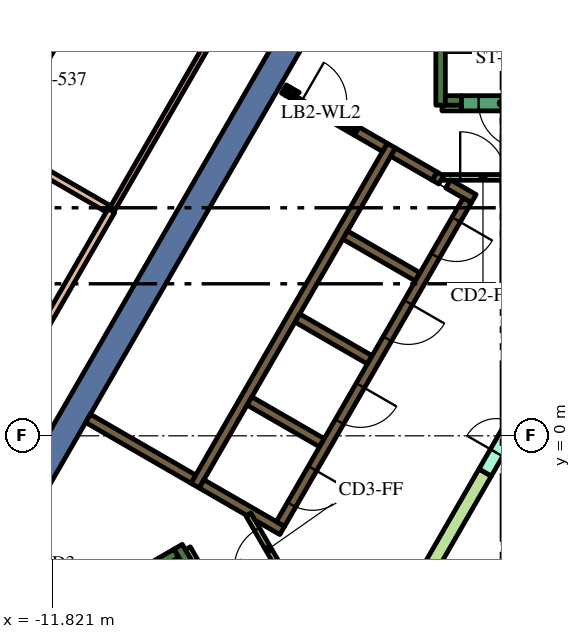
"""IFC4 building model, lengths in metres.
Left out: names, types, materials, properties, quantities, classifications, styles, units other than length and angle.
Written with IfcOpenShell. Run it as: python <this file> out.ifc"""

import sys

from ifc_helpers import new_model, si_unit, direction, frame, frame_2d, origin, place, context, subcontext, project, spatial, polyline, rectangle, outline, extrude, element, fill, save


model = new_model("IFC4")
c1 = context("Model", 3, precision=1e-05, world=origin(), true_north=direction((0.0, 1.0)))
c2 = subcontext(c1, "Body", "Model", "MODEL_VIEW")
j1 = project(units=[si_unit("LENGTHUNIT", "METRE"), si_unit("PLANEANGLEUNIT", "RADIAN")], contexts=[c1])
p1 = place(None, origin())
s1 = spatial("IfcSite", under=j1, at=p1, CompositionType="ELEMENT")
p2 = place(p1, origin())
s2 = spatial("IfcBuilding", under=s1, at=p2, CompositionType="ELEMENT")
p3 = place(p2, frame((0.0, 0.0, 261.6)))
s3 = spatial("IfcBuildingStorey", under=s2, at=p3, CompositionType="ELEMENT", Elevation=261.6)
p4 = place(p3, frame((-12.625, -1.867, 0.0), z_axis=(0.0, 0.0, 1.0), x_axis=(0.499996974394, 0.866027150612, 0.0)))
e1 = element("IfcWall", 1, at=p4, inside=s3, PredefinedType="SOLIDWALL", context=c2, shape_type="SweptSolid", body=[
    extrude(rectangle(XDim=15.858, YDim=0.7, at=frame_2d((7.929, 0.0))), origin(), (0.0, 0.0, 1.0), 5.4),
])
p5 = place(p3, frame((-1.6, 8.7, 0.0), z_axis=(0.0, 0.0, 1.0), x_axis=(0.0, 1.0, 0.0)))
e2 = element("IfcWall", 2, at=p5, inside=s3, PredefinedType="SOLIDWALL", context=c2, shape_type="SweptSolid", body=[
    extrude(rectangle(XDim=7.05, YDim=0.25, at=frame_2d((3.525, 0.0))), origin(), (0.0, 0.0, 1.0), 5.4),
])
p6 = place(p3, frame((-1.475, 8.825, 0.0), z_axis=(0.0, 0.0, 1.0), x_axis=(1.0, 0.0, 0.0)))
e3 = element("IfcWall", 3, at=p6, inside=s3, PredefinedType="SOLIDWALL", context=c2, shape_type="SweptSolid", body=[
    extrude(rectangle(XDim=0.425, YDim=0.25, at=frame_2d((0.212, 0.0))), origin(), (0.0, 0.0, 1.0), 5.4),
])
p7 = place(p3, frame((-14.44, -6.49, 0.0), z_axis=(0.0, 0.0, 1.0), x_axis=(0.866022966069, 0.500004222222, 0.0)))
e4 = element("IfcWall", 4, at=p7, inside=s3, PredefinedType="SOLIDWALL", context=c2, shape_type="SweptSolid", body=[
    extrude(rectangle(XDim=6.8, YDim=0.25, at=frame_2d((3.4, 0.0))), origin(), (0.0, 0.0, 1.0), 5.4),
])
p8 = place(p3, frame((-8.168, -3.503, 0.0), z_axis=(0.0, 0.0, 1.0), x_axis=(-0.499952099219, 0.866053057547, 0.0)))
e5 = element("IfcWall", 5, at=p8, inside=s3, PredefinedType="SOLIDWALL", context=c2, shape_type="SweptSolid", body=[
    extrude(rectangle(XDim=0.675, YDim=0.25, at=frame_2d((0.337, 0.0))), origin(), (0.0, 0.0, 1.0), 5.4),
])
p9 = place(p3, frame((-8.06, -1.311, 0.0), z_axis=(0.0, 0.0, 1.0), x_axis=(0.50000273126, 0.866023826885, 0.0)))
e6 = element("IfcWall", 6, at=p9, inside=s3, PredefinedType="SOLIDWALL", context=c2, shape_type="SweptSolid", body=[
    extrude(rectangle(XDim=10.33, YDim=0.25, at=frame_2d((5.165, 0.0))), origin(), (0.0, 0.0, 1.0), 5.4),
])
p10 = place(p3, frame((-1.758, 6.835, 0.0), z_axis=(0.0, 0.0, 1.0), x_axis=(0.865982457891, -0.500074377092, 0.0)))
e7 = element("IfcWall", 7, at=p10, inside=s3, PredefinedType="SOLIDWALL", context=c2, shape_type="SweptSolid", body=[
    extrude(rectangle(XDim=0.2, YDim=0.25, at=frame_2d((0.1, 0.0))), origin(), (0.0, 0.0, 1.0), 5.4),
])
p11 = place(p3, frame((-1.76, 6.836, 0.0), z_axis=(0.0, 0.0, 1.0), x_axis=(-0.865952863304, 0.500125622755, 0.0)))
e8 = element("IfcWall", 8, at=p11, inside=s3, PredefinedType="SOLIDWALL", context=c2, shape_type="SweptSolid", body=[
    extrude(rectangle(XDim=1.258, YDim=0.25, at=frame_2d((0.629, 0.0))), origin(), (0.0, 0.0, 1.0), 5.4),
])
p12 = place(p3, frame((-0.728, 6.24, 0.0), z_axis=(0.0, 0.0, 1.0), x_axis=(-0.865955664968, 0.500120771724, 0.0)))
e9 = element("IfcWall", 9, at=p12, inside=s3, PredefinedType="SOLIDWALL", context=c2, shape_type="SweptSolid", body=[
    extrude(rectangle(XDim=0.778, YDim=0.25, at=frame_2d((0.389, 0.0))), origin(), (0.0, 0.0, 1.0), 5.4),
])
for number, where, z_axis, x_axis in (
    (10, (-2.204, 4.182, 0.0), (0.0, 0.0, 1.0), (-0.866, 0.5, 0.0)),
    (11, (-5.369, 3.1, 0.0), (0.0, 0.0, 1.0), (0.866, -0.5, 0.0)),
    (12, (-4.724, -0.182, 0.0), (0.0, 0.0, 1.0), (-0.866, 0.5, 0.0)),
):
    element("IfcWall", number, at=place(p3, frame(where, z_axis=z_axis, x_axis=x_axis)), inside=s3, PredefinedType="SOLIDWALL", context=c2, shape_type="SweptSolid", body=[
        extrude(rectangle(XDim=2.2, YDim=0.25, at=frame_2d((1.1, 0.0))), origin(), (0.0, 0.0, 1.0), 5.4),
    ])
p13 = place(p3, origin())
e13 = element("IfcWall", 13, at=p13, inside=s3, PredefinedType="SOLIDWALL", context=c2, shape_type="SweptSolid", body=[
    extrude(outline(polyline([(-5.922, -2.257), (-5.922, -2.257), (-5.705, -2.382), (-5.83, -2.598), (-6.483, -2.221), (-6.591, -2.033), (-6.591, -2.033), (-6.7, -2.096), (-7.952, -1.373), (-7.827, -1.156), (-5.922, -2.257)])), origin(), (0.0, 0.0, 1.0), 5.4),
])
p14 = place(p3, frame((-8.106, -1.14, 0.0), z_axis=(0.0, 0.0, 1.0), x_axis=(-0.866008981251, 0.500028443584, 0.0)))
e14 = element("IfcWall", 14, at=p14, inside=s3, PredefinedType="SOLIDWALL", context=c2, shape_type="SweptSolid", body=[
    extrude(rectangle(XDim=3.2, YDim=0.25, at=frame_2d((1.6, 0.0))), origin(), (0.0, 0.0, 1.0), 5.4),
])
p15 = place(p3, frame((-5.725, 9.125, 0.0), z_axis=(0.0, 0.0, 1.0), x_axis=(0.866185586049, -0.49972245349, 0.0)))
e15 = element("IfcWall", 15, at=p15, inside=s3, PredefinedType="SOLIDWALL", context=c2, shape_type="SweptSolid", body=[
    extrude(rectangle(XDim=0.11, YDim=0.25, at=frame_2d((0.055, 0.0))), origin(), (0.0, 0.0, 1.0), 5.4),
])
p16 = place(p3, frame((-3.066, 7.59, 0.0), z_axis=(0.0, 0.0, 1.0), x_axis=(-0.866081358704, 0.49990307071, 0.0)))
e16 = element("IfcWall", 16, at=p16, inside=s3, PredefinedType="SOLIDWALL", context=c2, shape_type="SweptSolid", body=[
    extrude(rectangle(XDim=0.858, YDim=0.25, at=frame_2d((0.429, 0.0))), origin(), (0.0, 0.0, 1.0), 5.4),
])
e17 = element("IfcWall", 17, at=p13, inside=s3, PredefinedType="SOLIDWALL", context=c2, shape_type="SweptSolid", body=[
    extrude(outline(polyline([(-3.748, 8.128), (-3.813, 8.015), (-4.027, 8.139), (-4.017, 8.156), (-4.008, 8.173), (-4.0, 8.192), (-3.995, 8.21), (-3.991, 8.23), (-3.99, 8.25), (-3.99, 8.268), (-3.748, 8.128)])), origin(), (0.0, 0.0, 1.0), 5.4),
])
e18 = element("IfcWall", 18, at=p13, inside=s3, PredefinedType="SOLIDWALL", context=c2, shape_type="SweptSolid", body=[
    extrude(outline(polyline([(-5.689, 8.96), (-5.69, 8.961), (-5.565, 9.177), (-5.319, 9.035), (-5.335, 9.026), (-5.351, 9.015), (-5.366, 9.002), (-5.379, 8.988), (-5.392, 8.972), (-5.402, 8.956), (-5.412, 8.939), (-5.629, 9.064), (-5.629, 9.064), (-5.689, 8.96)])), origin(), (0.0, 0.0, 1.0), 5.4),
])
for number, where, z_axis, x_axis in (
    (19, (-8.252, -2.958, 0.0), (0.0, 0.0, 1.0), (0.5, -0.866, 0.0)),
    (20, (-1.564, 8.625, 0.0), (0.0, 0.0, 1.0), (1.0, 0.0, 0.0)),
):
    element("IfcWall", number, at=place(p3, frame(where, z_axis=z_axis, x_axis=x_axis)), inside=s3, PredefinedType="PARTITIONING", context=c2, shape_type="SweptSolid", body=[
        extrude(rectangle(XDim=0.514, YDim=0.15, at=frame_2d((0.257, 0.0))), origin(), (0.0, 0.0, 1.0), 4.75),
    ])
e21 = element("IfcWall", 21, at=p13, inside=s3, PredefinedType="PARTITIONING", context=c2, shape_type="SweptSolid", body=[
    extrude(outline(polyline([(-0.59, -0.872), (-0.265, -1.059), (-1.822, -3.756), (-2.147, -3.568), (-0.59, -0.872)])), origin(), (0.0, 0.0, 1.0), 4.75),
])
p17 = place(p3, frame((-0.898, 6.194, 0.0), z_axis=(0.0, 0.0, 1.0), x_axis=(-0.499996202215, -0.866027596426, 0.0)))
e22 = element("IfcWall", 22, at=p17, inside=s3, PredefinedType="SOLIDWALL", context=c2, shape_type="SweptSolid", body=[
    extrude(rectangle(XDim=9.83, YDim=0.25, at=frame_2d((4.915, 0.0))), origin(), (0.0, 0.0, 1.0), 5.4),
])
p18 = place(p17, frame((0.585, 0.0, 0.0)))
e23 = element("IfcOpeningElement", 23, at=p18, cuts=e22, PredefinedType="OPENING", context=c2, shape_type="SweptSolid", body=[
    extrude(rectangle(XDim=1.1, YDim=2.1, at=frame_2d((0.55, 1.05))), frame((0.0, 0.135, 0.0), z_axis=(0.0, -1.0, 0.0), x_axis=(1.0, 0.0, 0.0)), (0.0, 0.0, 1.0), 0.27),
])
p19 = place(p17, frame((3.105, 0.0, 0.0)))
e24 = element("IfcOpeningElement", 24, at=p19, cuts=e22, PredefinedType="OPENING", context=c2, shape_type="SweptSolid", body=[
    extrude(rectangle(XDim=1.1, YDim=2.1, at=frame_2d((0.55, 1.05))), frame((0.0, 0.135, 0.0), z_axis=(0.0, -1.0, 0.0), x_axis=(1.0, 0.0, 0.0)), (0.0, 0.0, 1.0), 0.27),
])
p20 = place(p17, frame((5.625, 0.0, 0.0)))
e25 = element("IfcOpeningElement", 25, at=p20, cuts=e22, PredefinedType="OPENING", context=c2, shape_type="SweptSolid", body=[
    extrude(rectangle(XDim=1.1, YDim=2.1, at=frame_2d((0.55, 1.05))), frame((0.0, 0.135, 0.0), z_axis=(0.0, -1.0, 0.0), x_axis=(1.0, 0.0, 0.0)), (0.0, 0.0, 1.0), 0.27),
])
p21 = place(p17, frame((8.145, 0.0, 0.0)))
e26 = element("IfcOpeningElement", 26, at=p21, cuts=e22, PredefinedType="OPENING", context=c2, shape_type="SweptSolid", body=[
    extrude(rectangle(XDim=1.1, YDim=2.1, at=frame_2d((0.55, 1.05))), frame((0.0, 0.135, 0.0), z_axis=(0.0, -1.0, 0.0), x_axis=(1.0, 0.0, 0.0)), (0.0, 0.0, 1.0), 0.27),
])
p22 = place(p3, frame((1.05, 8.75, 0.0), z_axis=(0.0, 0.0, 1.0), x_axis=(-1.0, 0.0, 0.0)))
e27 = element("IfcWall", 27, at=p22, inside=s3, PredefinedType="SOLIDWALL", context=c2, shape_type="SweptSolid", body=[
    extrude(rectangle(XDim=2.1, YDim=0.4, at=frame_2d((1.05, 0.0))), origin(), (0.0, 0.0, 1.0), 5.4),
])
p23 = place(p22, frame((0.45, 0.0, 0.0)))
e28 = element("IfcOpeningElement", 28, at=p23, cuts=e27, PredefinedType="OPENING", context=c2, shape_type="SweptSolid", body=[
    extrude(rectangle(XDim=1.2, YDim=2.1, at=frame_2d((0.6, 1.05))), frame((0.0, 0.21, 0.0), z_axis=(0.0, -1.0, 0.0), x_axis=(1.0, 0.0, 0.0)), (0.0, 0.0, 1.0), 0.42),
])
p24 = place(p3, frame((-0.427, -0.966, 0.0), z_axis=(0.0, 0.0, 1.0), x_axis=(0.49994051562, 0.866059744384, 0.0)))
e29 = element("IfcWall", 29, at=p24, inside=s3, PredefinedType="PARTITIONING", context=c2, shape_type="SweptSolid", body=[
    extrude(rectangle(XDim=2.1, YDim=0.375, at=frame_2d((1.05, 0.0))), origin(), (0.0, 0.0, 1.0), 4.75),
])
p25 = place(p24, frame((0.6, 0.0, 0.0)))
e30 = element("IfcOpeningElement", 30, at=p25, cuts=e29, PredefinedType="OPENING", context=c2, shape_type="SweptSolid", body=[
    extrude(rectangle(XDim=0.9, YDim=2.1, at=frame_2d((0.45, 1.05))), frame((0.0, 0.198, 0.0), z_axis=(0.0, -1.0, 0.0), x_axis=(1.0, 0.0, 0.0)), (0.0, 0.0, 1.0), 0.395),
])
p26 = place(p3, frame((-1.534, 6.8, 0.0), z_axis=(0.0, 0.0, 1.0), x_axis=(1.0, 0.0, 0.0)))
e31 = element("IfcWall", 31, at=p26, inside=s3, PredefinedType="PARTITIONING", context=c2, shape_type="SweptSolid", body=[
    extrude(rectangle(XDim=2.1, YDim=0.15, at=frame_2d((1.05, 0.0))), origin(), (0.0, 0.0, 1.0), 4.75),
])
p27 = place(p26, frame((0.45, 0.0, 0.0)))
e32 = element("IfcOpeningElement", 32, at=p27, cuts=e31, PredefinedType="OPENING", context=c2, shape_type="SweptSolid", body=[
    extrude(rectangle(XDim=1.2, YDim=2.1, at=frame_2d((0.6, 1.05))), frame((0.0, 0.085, 0.0), z_axis=(0.0, -1.0, 0.0), x_axis=(1.0, 0.0, 0.0)), (0.0, 0.0, 1.0), 0.17),
])
p28 = place(p3, frame((-5.606, -3.89, 0.0), z_axis=(0.0, 0.0, 1.0), x_axis=(-0.500027713859, 0.866009402589, 0.0)))
e33 = element("IfcWall", 33, at=p28, inside=s3, PredefinedType="PARTITIONING", context=c2, shape_type="SweptSolid", body=[
    extrude(rectangle(XDim=2.1, YDim=0.15, at=frame_2d((1.05, 0.0))), origin(), (0.0, 0.0, 1.0), 4.75),
])
p29 = place(p28, frame((0.45, 0.0, 0.0)))
e34 = element("IfcOpeningElement", 34, at=p29, cuts=e33, PredefinedType="OPENING", context=c2, shape_type="SweptSolid", body=[
    extrude(rectangle(XDim=1.2, YDim=2.1, at=frame_2d((0.6, 1.05))), frame((0.0, 0.085, 0.0), z_axis=(0.0, -1.0, 0.0), x_axis=(1.0, 0.0, 0.0)), (0.0, 0.0, 1.0), 0.17),
])
p30 = place(p3, frame((-5.659, 9.012, 0.0), z_axis=(0.0, 0.0, 1.0), x_axis=(0.866009402589, -0.500027713859, 0.0)))
e35 = element("IfcWall", 35, at=p30, inside=s3, PredefinedType="PARTITIONING", context=c2, shape_type="SweptSolid", body=[
    extrude(rectangle(XDim=2.1, YDim=0.12, at=frame_2d((1.05, 0.0))), origin(), (0.0, 0.0, 1.0), 4.75),
])
p31 = place(p30, frame((0.45, 0.0, 0.0)))
e36 = element("IfcOpeningElement", 36, at=p31, cuts=e35, PredefinedType="OPENING", context=c2, shape_type="SweptSolid", body=[
    extrude(rectangle(XDim=1.2, YDim=2.1, at=frame_2d((0.6, 1.05))), frame((0.0, 0.07, 0.0), z_axis=(0.0, -1.0, 0.0), x_axis=(1.0, 0.0, 0.0)), (0.0, 0.0, 1.0), 0.14),
])
p32 = place(p3, frame((-10.262, 5.925, 0.0), z_axis=(0.0, 0.0, 1.0), x_axis=(-0.499997784101, -0.866026683131, 0.0)))
e37 = element("IfcWall", 37, at=p32, inside=s3, PredefinedType="PARTITIONING", context=c2, shape_type="SweptSolid", body=[
    extrude(rectangle(XDim=14.174, YDim=0.2, at=frame_2d((7.087, 0.0))), origin(), (0.0, 0.0, 1.0), 4.75),
])
p33 = place(p32, frame((6.487, 0.0, 0.0)))
e38 = element("IfcOpeningElement", 38, at=p33, cuts=e37, PredefinedType="OPENING", context=c2, shape_type="SweptSolid", body=[
    extrude(rectangle(XDim=1.2, YDim=2.1, at=frame_2d((0.6, 1.05))), frame((0.0, 0.11, 0.0), z_axis=(0.0, -1.0, 0.0), x_axis=(1.0, 0.0, 0.0)), (0.0, 0.0, 1.0), 0.22),
])
p34 = place(p3, frame((-3.175, 18.2, 0.0), z_axis=(0.0, 0.0, 1.0), x_axis=(-0.500015389047, -0.866016518732, 0.0)))
e39 = element("IfcWall", 39, at=p34, inside=s3, PredefinedType="PARTITIONING", context=c2, shape_type="SweptSolid", body=[
    extrude(rectangle(XDim=14.164, YDim=0.15, at=frame_2d((7.082, 0.0))), origin(), (0.0, 0.0, 1.0), 4.75),
])
p35 = place(p34, frame((6.632, 0.0, 0.0)))
e40 = element("IfcOpeningElement", 40, at=p35, cuts=e39, PredefinedType="OPENING", context=c2, shape_type="SweptSolid", body=[
    extrude(rectangle(XDim=0.9, YDim=2.1, at=frame_2d((0.45, 1.05))), frame((0.0, 0.085, 0.0), z_axis=(0.0, -1.0, 0.0), x_axis=(1.0, 0.0, 0.0)), (0.0, 0.0, 1.0), 0.17),
])
p36 = place(p3, frame((-14.207, 8.203, 0.0), z_axis=(0.0, 0.0, 1.0), x_axis=(0.866022231217, -0.500005495009, 0.0)))
e41 = element("IfcWall", 41, at=p36, inside=s3, PredefinedType="PARTITIONING", context=c2, shape_type="SweptSolid", body=[
    extrude(rectangle(XDim=4.455, YDim=0.2, at=frame_2d((2.228, 0.0))), origin(), (0.0, 0.0, 1.0), 4.75),
])
p37 = place(p18, origin())
e42 = element("IfcDoor", 42, at=p37, inside=s3, OperationType="DOUBLE_DOOR_SLIDING", PredefinedType="DOOR", context=c2, shape_type="SweptSolid", body=[
    extrude(rectangle(XDim=1.1, YDim=2.1, at=frame_2d((0.55, 1.05))), frame((0.0, 0.025, 0.0), z_axis=(0.0, -1.0, 0.0), x_axis=(1.0, 0.0, 0.0)), (0.0, 0.0, 1.0), 0.05),
])
fill(e23, e42)
p38 = place(p19, origin())
e43 = element("IfcDoor", 43, at=p38, inside=s3, OperationType="DOUBLE_DOOR_SLIDING", PredefinedType="DOOR", context=c2, shape_type="SweptSolid", body=[
    extrude(rectangle(XDim=1.1, YDim=2.1, at=frame_2d((0.55, 1.05))), frame((0.0, 0.025, 0.0), z_axis=(0.0, -1.0, 0.0), x_axis=(1.0, 0.0, 0.0)), (0.0, 0.0, 1.0), 0.05),
])
fill(e24, e43)
p39 = place(p20, origin())
e44 = element("IfcDoor", 44, at=p39, inside=s3, OperationType="DOUBLE_DOOR_SLIDING", PredefinedType="DOOR", context=c2, shape_type="SweptSolid", body=[
    extrude(rectangle(XDim=1.1, YDim=2.1, at=frame_2d((0.55, 1.05))), frame((0.0, 0.025, 0.0), z_axis=(0.0, -1.0, 0.0), x_axis=(1.0, 0.0, 0.0)), (0.0, 0.0, 1.0), 0.05),
])
fill(e25, e44)
p40 = place(p21, origin())
e45 = element("IfcDoor", 45, at=p40, inside=s3, OperationType="DOUBLE_DOOR_SLIDING", PredefinedType="DOOR", context=c2, shape_type="SweptSolid", body=[
    extrude(rectangle(XDim=1.1, YDim=2.1, at=frame_2d((0.55, 1.05))), frame((0.0, 0.025, 0.0), z_axis=(0.0, -1.0, 0.0), x_axis=(1.0, 0.0, 0.0)), (0.0, 0.0, 1.0), 0.05),
])
fill(e26, e45)
p41 = place(p23, origin())
e46 = element("IfcDoor", 46, at=p41, inside=s3, OperationType="SINGLE_SWING_LEFT", PredefinedType="DOOR", context=c2, shape_type="SweptSolid", body=[
    extrude(rectangle(XDim=1.2, YDim=2.1, at=frame_2d((0.6, 1.05))), frame((0.0, 0.025, 0.0), z_axis=(0.0, -1.0, 0.0), x_axis=(1.0, 0.0, 0.0)), (0.0, 0.0, 1.0), 0.05),
])
fill(e28, e46)
p42 = place(p25, origin())
e47 = element("IfcDoor", 47, at=p42, inside=s3, OperationType="SINGLE_SWING_LEFT", PredefinedType="DOOR", context=c2, shape_type="SweptSolid", body=[
    extrude(rectangle(XDim=0.9, YDim=2.1, at=frame_2d((0.45, 1.05))), frame((0.0, 0.025, 0.0), z_axis=(0.0, -1.0, 0.0), x_axis=(1.0, 0.0, 0.0)), (0.0, 0.0, 1.0), 0.05),
])
fill(e30, e47)
p43 = place(p27, origin())
e48 = element("IfcDoor", 48, at=p43, inside=s3, OperationType="SINGLE_SWING_LEFT", PredefinedType="DOOR", context=c2, shape_type="SweptSolid", body=[
    extrude(rectangle(XDim=1.2, YDim=2.1, at=frame_2d((0.6, 1.05))), frame((0.0, 0.025, 0.0), z_axis=(0.0, -1.0, 0.0), x_axis=(1.0, 0.0, 0.0)), (0.0, 0.0, 1.0), 0.05),
])
fill(e32, e48)
p44 = place(p29, origin())
e49 = element("IfcDoor", 49, at=p44, inside=s3, OperationType="SINGLE_SWING_LEFT", PredefinedType="DOOR", context=c2, shape_type="SweptSolid", body=[
    extrude(rectangle(XDim=1.2, YDim=2.1, at=frame_2d((0.6, 1.05))), frame((0.0, 0.025, 0.0), z_axis=(0.0, -1.0, 0.0), x_axis=(1.0, 0.0, 0.0)), (0.0, 0.0, 1.0), 0.05),
])
fill(e34, e49)
p45 = place(p31, origin())
e50 = element("IfcDoor", 50, at=p45, inside=s3, OperationType="SINGLE_SWING_LEFT", PredefinedType="DOOR", context=c2, shape_type="SweptSolid", body=[
    extrude(rectangle(XDim=1.2, YDim=2.1, at=frame_2d((0.6, 1.05))), frame((0.0, 0.025, 0.0), z_axis=(0.0, -1.0, 0.0), x_axis=(1.0, 0.0, 0.0)), (0.0, 0.0, 1.0), 0.05),
])
fill(e36, e50)
save(model, sys.argv[1])
